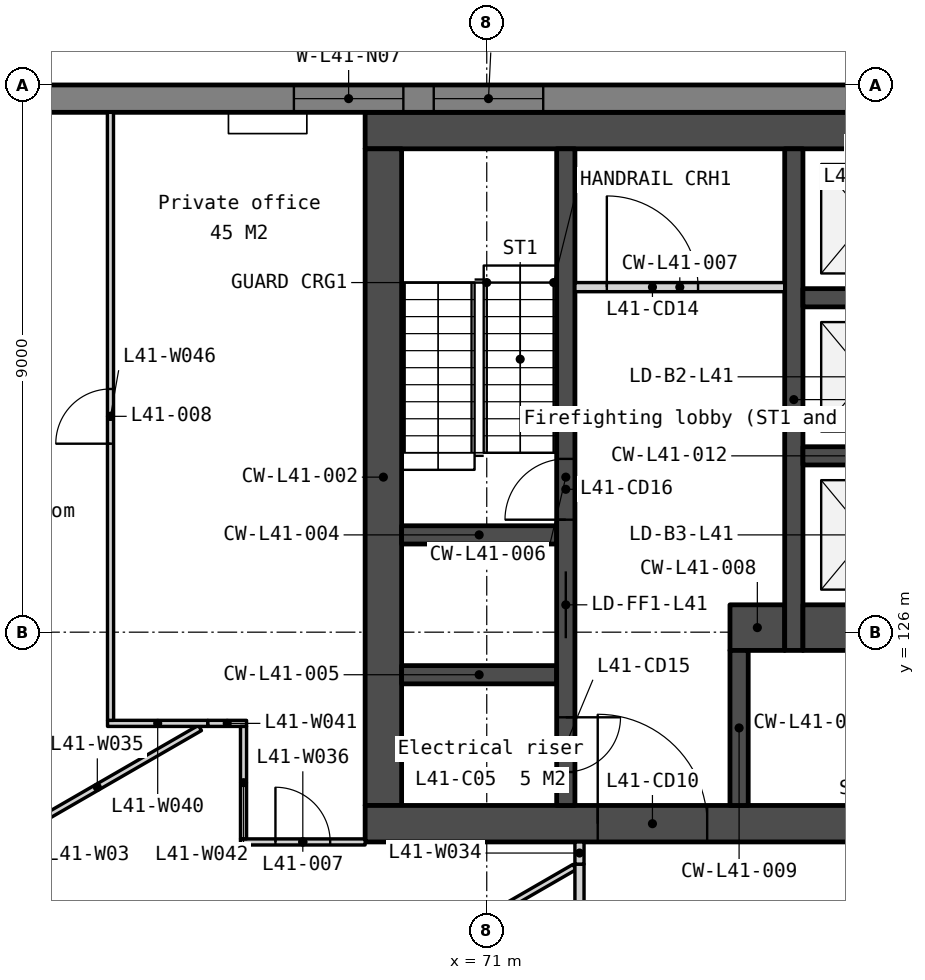
"""IFC4 building model, lengths in metres.
Left out: names, types, materials, properties, quantities, classifications, styles, units other than length and angle.
Written with IfcOpenShell. Run it as: python <this file> out.ifc"""

import sys

from ifc_helpers import new_model, si_unit, direction, frame, frame_2d, origin, place, context, subcontext, project, spatial, polyline, rectangle, outline, extrude, element, fill, save


model = new_model("IFC4")
c1 = context("Model", 3, precision=1e-05, world=origin(), true_north=direction((0.0, 1.0)))
c2 = subcontext(c1, "Body", "Model", "MODEL_VIEW")
j1 = project(units=[si_unit("LENGTHUNIT", "METRE"), si_unit("PLANEANGLEUNIT", "RADIAN")], contexts=[c1])
p1 = place(None, origin())
s1 = spatial("IfcSite", under=j1, at=p1, CompositionType="ELEMENT")
p2 = place(p1, origin())
s2 = spatial("IfcBuilding", under=s1, at=p2, CompositionType="ELEMENT")
p3 = place(p2, frame((0.0, 0.0, 163.7)))
s3 = spatial("IfcBuildingStorey", under=s2, at=p3, CompositionType="ELEMENT", Elevation=163.7)
p4 = place(p3, frame((69.0, 134.25, 0.0), z_axis=(0.0, 0.0, 1.0), x_axis=(1.0, 0.0, 0.0)))
e1 = element("IfcWall", 1, at=p4, inside=s3, PredefinedType="SOLIDWALL", context=c2, shape_type="SweptSolid", body=[
    extrude(rectangle(XDim=22.0, YDim=0.6, at=frame_2d((11.0, 0.0))), origin(), (0.0, 0.0, 1.0), 3.75),
])
p5 = place(p3, frame((69.3, 133.95, 0.0), z_axis=(0.0, 0.0, 1.0), x_axis=(0.0, -1.0, 0.0)))
e2 = element("IfcWall", 2, at=p5, inside=s3, PredefinedType="SOLIDWALL", context=c2, shape_type="SweptSolid", body=[
    extrude(rectangle(XDim=10.8, YDim=0.6, at=frame_2d((5.4, 0.0))), origin(), (0.0, 0.0, 1.0), 3.75),
])
p6 = place(p3, frame((69.0, 122.85, 0.0), z_axis=(0.0, 0.0, 1.0), x_axis=(1.0, 0.0, 0.0)))
e3 = element("IfcWall", 3, at=p6, inside=s3, PredefinedType="SOLIDWALL", context=c2, shape_type="SweptSolid", body=[
    extrude(rectangle(XDim=22.0, YDim=0.6, at=frame_2d((11.0, 0.0))), origin(), (0.0, 0.0, 1.0), 3.75),
])
p7 = place(p6, frame((16.375, 0.0, 0.0)))
e4 = element("IfcOpeningElement", 4, at=p7, cuts=e3, PredefinedType="OPENING", context=c2, shape_type="SweptSolid", body=[
    extrude(rectangle(XDim=1.8, YDim=2.1, at=frame_2d((0.9, 1.05))), frame((0.0, 0.31, 0.0), z_axis=(0.0, -1.0, 0.0), x_axis=(1.0, 0.0, 0.0)), (0.0, 0.0, 1.0), 0.62),
])
p8 = place(p6, frame((3.825, 0.0, 0.0)))
e5 = element("IfcOpeningElement", 5, at=p8, cuts=e3, PredefinedType="OPENING", context=c2, shape_type="SweptSolid", body=[
    extrude(rectangle(XDim=1.8, YDim=2.1, at=frame_2d((0.9, 1.05))), frame((0.0, 0.31, 0.0), z_axis=(0.0, -1.0, 0.0), x_axis=(1.0, 0.0, 0.0)), (0.0, 0.0, 1.0), 0.62),
])
p9 = place(p6, frame((12.85, 0.0, 0.0)))
e6 = element("IfcOpeningElement", 6, at=p9, cuts=e3, PredefinedType="OPENING", context=c2, shape_type="SweptSolid", body=[
    extrude(rectangle(XDim=1.5, YDim=2.1, at=frame_2d((0.75, 1.05))), frame((0.0, 0.31, 0.0), z_axis=(0.0, -1.0, 0.0), x_axis=(1.0, 0.0, 0.0)), (0.0, 0.0, 1.0), 0.62),
])
for number, where, z_axis, x_axis in (
    (7, (69.6, 127.6, 0.0), (0.0, 0.0, 1.0), (1.0, 0.0, 0.0)),
    (8, (69.6, 125.3, 0.0), (0.0, 0.0, 1.0), (1.0, 0.0, 0.0)),
):
    element("IfcWall", number, at=place(p3, frame(where, z_axis=z_axis, x_axis=x_axis)), inside=s3, PredefinedType="SOLIDWALL", context=c2, shape_type="SweptSolid", body=[
        extrude(rectangle(XDim=2.55, YDim=0.3, at=frame_2d((1.275, 0.0))), origin(), (0.0, 0.0, 1.0), 3.75),
    ])
p10 = place(p3, frame((72.3, 133.95, 0.0), z_axis=(0.0, 0.0, 1.0), x_axis=(0.0, -1.0, 0.0)))
e9 = element("IfcWall", 9, at=p10, inside=s3, PredefinedType="SOLIDWALL", context=c2, shape_type="SweptSolid", body=[
    extrude(rectangle(XDim=10.8, YDim=0.3, at=frame_2d((5.4, 0.0))), origin(), (0.0, 0.0, 1.0), 3.75),
])
p11 = place(p10, frame((6.95, 0.0, 0.0)))
e10 = element("IfcOpeningElement", 10, at=p11, cuts=e9, PredefinedType="OPENING", context=c2, shape_type="SweptSolid", body=[
    extrude(rectangle(XDim=1.1, YDim=2.1, at=frame_2d((0.55, 1.05))), frame((0.0, 0.16, 0.0), z_axis=(0.0, -1.0, 0.0), x_axis=(1.0, 0.0, 0.0)), (0.0, 0.0, 1.0), 0.32),
])
p12 = place(p10, frame((9.35, 0.0, 0.0)))
e11 = element("IfcOpeningElement", 11, at=p12, cuts=e9, PredefinedType="OPENING", context=c2, shape_type="SweptSolid", body=[
    extrude(rectangle(XDim=0.9, YDim=2.1, at=frame_2d((0.45, 1.05))), frame((0.0, 0.16, 0.0), z_axis=(0.0, -1.0, 0.0), x_axis=(1.0, 0.0, 0.0)), (0.0, 0.0, 1.0), 0.32),
])
p13 = place(p10, frame((5.1, 0.0, 0.0)))
e12 = element("IfcOpeningElement", 12, at=p13, cuts=e9, PredefinedType="OPENING", context=c2, shape_type="SweptSolid", body=[
    extrude(rectangle(XDim=1.0, YDim=2.1, at=frame_2d((0.5, 1.05))), frame((0.0, 0.16, 0.0), z_axis=(0.0, -1.0, 0.0), x_axis=(1.0, 0.0, 0.0)), (0.0, 0.0, 1.0), 0.32),
])
p14 = place(p3, frame((72.45, 131.675, 0.0), z_axis=(0.0, 0.0, 1.0), x_axis=(1.0, 0.0, 0.0)))
e13 = element("IfcWall", 13, at=p14, inside=s3, PredefinedType="PARTITIONING", context=c2, shape_type="SweptSolid", body=[
    extrude(rectangle(XDim=3.45, YDim=0.15, at=frame_2d((1.725, 0.0))), origin(), (0.0, 0.0, 1.0), 3.75),
])
p15 = place(p14, frame((0.525, 0.0, 0.0)))
e14 = element("IfcOpeningElement", 14, at=p15, cuts=e13, PredefinedType="OPENING", context=c2, shape_type="SweptSolid", body=[
    extrude(rectangle(XDim=1.5, YDim=2.1, at=frame_2d((0.75, 1.05))), frame((0.0, 0.085, 0.0), z_axis=(0.0, -1.0, 0.0), x_axis=(1.0, 0.0, 0.0)), (0.0, 0.0, 1.0), 0.17),
])
p16 = place(p3, frame((75.0, 126.075, 0.0), z_axis=(0.0, 0.0, 1.0), x_axis=(1.0, 0.0, 0.0)))
e15 = element("IfcWall", 15, at=p16, inside=s3, PredefinedType="SOLIDWALL", context=c2, shape_type="SweptSolid", body=[
    extrude(rectangle(XDim=0.9, YDim=0.75, at=frame_2d((0.45, 0.0))), origin(), (0.0, 0.0, 1.0), 3.75),
])
p17 = place(p3, frame((75.15, 125.7, 0.0), z_axis=(0.0, 0.0, 1.0), x_axis=(0.0, -1.0, 0.0)))
e16 = element("IfcWall", 16, at=p17, inside=s3, PredefinedType="SOLIDWALL", context=c2, shape_type="SweptSolid", body=[
    extrude(rectangle(XDim=2.55, YDim=0.3, at=frame_2d((1.275, 0.0))), origin(), (0.0, 0.0, 1.0), 3.75),
])
p18 = place(p3, frame((76.05, 133.95, 0.0), z_axis=(0.0, 0.0, 1.0), x_axis=(0.0, -1.0, 0.0)))
e17 = element("IfcWall", 17, at=p18, inside=s3, PredefinedType="SOLIDWALL", context=c2, shape_type="SweptSolid", body=[
    extrude(rectangle(XDim=8.25, YDim=0.3, at=frame_2d((4.125, 0.0))), origin(), (0.0, 0.0, 1.0), 3.75),
])
for number, where, z_axis, x_axis in (
    (18, (76.2, 131.5, 0.0), (0.0, 0.0, 1.0), (1.0, 0.0, 0.0)),
    (19, (76.2, 128.9, 0.0), (0.0, 0.0, 1.0), (1.0, 0.0, 0.0)),
):
    element("IfcWall", number, at=place(p3, frame(where, z_axis=z_axis, x_axis=x_axis)), inside=s3, PredefinedType="SOLIDWALL", context=c2, shape_type="SweptSolid", body=[
        extrude(rectangle(XDim=2.1, YDim=0.3, at=frame_2d((1.05, 0.0))), origin(), (0.0, 0.0, 1.0), 3.75),
    ])
p19 = place(p3, frame((76.2, 126.075, 0.0), z_axis=(0.0, 0.0, 1.0), x_axis=(1.0, 0.0, 0.0)))
e20 = element("IfcWall", 20, at=p19, inside=s3, PredefinedType="SOLIDWALL", context=c2, shape_type="SweptSolid", body=[
    extrude(rectangle(XDim=2.1, YDim=0.75, at=frame_2d((1.05, 0.0))), origin(), (0.0, 0.0, 1.0), 3.75),
])
p20 = place(p3, frame((100.243, 134.775, -0.15), z_axis=(0.0, 0.0, 1.0), x_axis=(-1.0, 0.0, 0.0)))
e21 = element("IfcWall", 21, at=p20, inside=s3, PredefinedType="SOLIDWALL", context=c2, shape_type="SweptSolid", body=[
    extrude(outline(polyline([(40.486, 0.0), (40.486, 3.9), (0.0, 3.9), (0.0, 0.0), (40.486, 0.0)])), frame((0.0, 0.225, 0.0), z_axis=(0.0, -1.0, 0.0), x_axis=(1.0, 0.0, 0.0)), (0.0, 0.0, 1.0), 0.45),
])
p21 = place(p20, frame((0.837, 0.0, 0.95)))
e22 = element("IfcOpeningElement", 22, at=p21, cuts=e21, PredefinedType="OPENING", context=c2, shape_type="SweptSolid", body=[
    extrude(rectangle(XDim=1.2, YDim=2.2, at=frame_2d((0.6, 1.1))), frame((0.0, 0.235, 0.0), z_axis=(0.0, -1.0, 0.0), x_axis=(1.0, 0.0, 0.0)), (0.0, 0.0, 1.0), 0.47),
])
p22 = place(p20, frame((8.072, 0.0, 0.95)))
e23 = element("IfcOpeningElement", 23, at=p22, cuts=e21, PredefinedType="OPENING", context=c2, shape_type="SweptSolid", body=[
    extrude(rectangle(XDim=1.8, YDim=2.2, at=frame_2d((0.9, 1.1))), frame((0.0, 0.235, 0.0), z_axis=(0.0, -1.0, 0.0), x_axis=(1.0, 0.0, 0.0)), (0.0, 0.0, 1.0), 0.47),
])
p23 = place(p20, frame((10.372, 0.0, 0.95)))
e24 = element("IfcOpeningElement", 24, at=p23, cuts=e21, PredefinedType="OPENING", context=c2, shape_type="SweptSolid", body=[
    extrude(rectangle(XDim=1.8, YDim=2.2, at=frame_2d((0.9, 1.1))), frame((0.0, 0.235, 0.0), z_axis=(0.0, -1.0, 0.0), x_axis=(1.0, 0.0, 0.0)), (0.0, 0.0, 1.0), 0.47),
])
p24 = place(p20, frame((18.193, 0.0, 0.95)))
e25 = element("IfcOpeningElement", 25, at=p24, cuts=e21, PredefinedType="OPENING", context=c2, shape_type="SweptSolid", body=[
    extrude(rectangle(XDim=1.8, YDim=2.2, at=frame_2d((0.9, 1.1))), frame((0.0, 0.235, 0.0), z_axis=(0.0, -1.0, 0.0), x_axis=(1.0, 0.0, 0.0)), (0.0, 0.0, 1.0), 0.47),
])
p25 = place(p20, frame((20.493, 0.0, 0.95)))
e26 = element("IfcOpeningElement", 26, at=p25, cuts=e21, PredefinedType="OPENING", context=c2, shape_type="SweptSolid", body=[
    extrude(rectangle(XDim=1.8, YDim=2.2, at=frame_2d((0.9, 1.1))), frame((0.0, 0.235, 0.0), z_axis=(0.0, -1.0, 0.0), x_axis=(1.0, 0.0, 0.0)), (0.0, 0.0, 1.0), 0.47),
])
p26 = place(p20, frame((28.315, 0.0, 0.95)))
e27 = element("IfcOpeningElement", 27, at=p26, cuts=e21, PredefinedType="OPENING", context=c2, shape_type="SweptSolid", body=[
    extrude(rectangle(XDim=1.8, YDim=2.2, at=frame_2d((0.9, 1.1))), frame((0.0, 0.235, 0.0), z_axis=(0.0, -1.0, 0.0), x_axis=(1.0, 0.0, 0.0)), (0.0, 0.0, 1.0), 0.47),
])
p27 = place(p20, frame((30.615, 0.0, 0.95)))
e28 = element("IfcOpeningElement", 28, at=p27, cuts=e21, PredefinedType="OPENING", context=c2, shape_type="SweptSolid", body=[
    extrude(rectangle(XDim=1.8, YDim=2.2, at=frame_2d((0.9, 1.1))), frame((0.0, 0.235, 0.0), z_axis=(0.0, -1.0, 0.0), x_axis=(1.0, 0.0, 0.0)), (0.0, 0.0, 1.0), 0.47),
])
p28 = place(p20, frame((38.449, 0.0, 0.95)))
e29 = element("IfcOpeningElement", 29, at=p28, cuts=e21, PredefinedType="OPENING", context=c2, shape_type="SweptSolid", body=[
    extrude(rectangle(XDim=1.2, YDim=2.2, at=frame_2d((0.6, 1.1))), frame((0.0, 0.235, 0.0), z_axis=(0.0, -1.0, 0.0), x_axis=(1.0, 0.0, 0.0)), (0.0, 0.0, 1.0), 0.47),
])
p29 = place(p3, frame((57.652, 131.129, -0.15), z_axis=(0.0, 0.0, 1.0), x_axis=(0.499997369791, -0.866026922331, 0.0)))
e30 = element("IfcWall", 30, at=p29, inside=s3, PredefinedType="SOLIDWALL", context=c2, shape_type="SweptSolid", body=[
    extrude(outline(polyline([(40.486, 0.0), (40.486, 3.9), (0.0, 3.9), (0.0, 0.0), (40.486, 0.0)])), frame((0.0, 0.225, 0.0), z_axis=(0.0, -1.0, 0.0), x_axis=(1.0, 0.0, 0.0)), (0.0, 0.0, 1.0), 0.45),
])
p30 = place(p29, frame((0.837, 0.0, 0.95)))
e31 = element("IfcOpeningElement", 31, at=p30, cuts=e30, PredefinedType="OPENING", context=c2, shape_type="SweptSolid", body=[
    extrude(rectangle(XDim=1.2, YDim=2.2, at=frame_2d((0.6, 1.1))), frame((0.0, 0.235, 0.0), z_axis=(0.0, -1.0, 0.0), x_axis=(1.0, 0.0, 0.0)), (0.0, 0.0, 1.0), 0.47),
])
p31 = place(p29, frame((8.072, 0.0, 0.95)))
e32 = element("IfcOpeningElement", 32, at=p31, cuts=e30, PredefinedType="OPENING", context=c2, shape_type="SweptSolid", body=[
    extrude(rectangle(XDim=1.8, YDim=2.2, at=frame_2d((0.9, 1.1))), frame((0.0, 0.235, 0.0), z_axis=(0.0, -1.0, 0.0), x_axis=(1.0, 0.0, 0.0)), (0.0, 0.0, 1.0), 0.47),
])
p32 = place(p29, frame((10.372, 0.0, 0.95)))
e33 = element("IfcOpeningElement", 33, at=p32, cuts=e30, PredefinedType="OPENING", context=c2, shape_type="SweptSolid", body=[
    extrude(rectangle(XDim=1.8, YDim=2.2, at=frame_2d((0.9, 1.1))), frame((0.0, 0.235, 0.0), z_axis=(0.0, -1.0, 0.0), x_axis=(1.0, 0.0, 0.0)), (0.0, 0.0, 1.0), 0.47),
])
p33 = place(p29, frame((18.193, 0.0, 0.95)))
e34 = element("IfcOpeningElement", 34, at=p33, cuts=e30, PredefinedType="OPENING", context=c2, shape_type="SweptSolid", body=[
    extrude(rectangle(XDim=1.8, YDim=2.2, at=frame_2d((0.9, 1.1))), frame((0.0, 0.235, 0.0), z_axis=(0.0, -1.0, 0.0), x_axis=(1.0, 0.0, 0.0)), (0.0, 0.0, 1.0), 0.47),
])
p34 = place(p29, frame((20.493, 0.0, 0.95)))
e35 = element("IfcOpeningElement", 35, at=p34, cuts=e30, PredefinedType="OPENING", context=c2, shape_type="SweptSolid", body=[
    extrude(rectangle(XDim=1.8, YDim=2.2, at=frame_2d((0.9, 1.1))), frame((0.0, 0.235, 0.0), z_axis=(0.0, -1.0, 0.0), x_axis=(1.0, 0.0, 0.0)), (0.0, 0.0, 1.0), 0.47),
])
p35 = place(p29, frame((28.315, 0.0, 0.95)))
e36 = element("IfcOpeningElement", 36, at=p35, cuts=e30, PredefinedType="OPENING", context=c2, shape_type="SweptSolid", body=[
    extrude(rectangle(XDim=1.8, YDim=2.2, at=frame_2d((0.9, 1.1))), frame((0.0, 0.235, 0.0), z_axis=(0.0, -1.0, 0.0), x_axis=(1.0, 0.0, 0.0)), (0.0, 0.0, 1.0), 0.47),
])
p36 = place(p29, frame((30.615, 0.0, 0.95)))
e37 = element("IfcOpeningElement", 37, at=p36, cuts=e30, PredefinedType="OPENING", context=c2, shape_type="SweptSolid", body=[
    extrude(rectangle(XDim=1.8, YDim=2.2, at=frame_2d((0.9, 1.1))), frame((0.0, 0.235, 0.0), z_axis=(0.0, -1.0, 0.0), x_axis=(1.0, 0.0, 0.0)), (0.0, 0.0, 1.0), 0.47),
])
p37 = place(p29, frame((38.449, 0.0, 0.95)))
e38 = element("IfcOpeningElement", 38, at=p37, cuts=e30, PredefinedType="OPENING", context=c2, shape_type="SweptSolid", body=[
    extrude(rectangle(XDim=1.2, YDim=2.2, at=frame_2d((0.6, 1.1))), frame((0.0, 0.235, 0.0), z_axis=(0.0, -1.0, 0.0), x_axis=(1.0, 0.0, 0.0)), (0.0, 0.0, 1.0), 0.47),
])
p38 = place(p3, frame((65.438, 118.093, 0.0), z_axis=(0.0, 0.0, 1.0), x_axis=(0.866029768103, 0.499992440702, 0.0)))
e39 = element("IfcWall", 39, at=p38, inside=s3, PredefinedType="PARTITIONING", context=c2, shape_type="SweptSolid", body=[
    extrude(rectangle(XDim=8.089, YDim=0.1, at=frame_2d((4.044, 0.0))), origin(), (0.0, 0.0, 1.0), 3.75),
])
p39 = place(p38, frame((3.594, 0.0, 0.0)))
e40 = element("IfcOpeningElement", 40, at=p39, cuts=e39, PredefinedType="OPENING", context=c2, shape_type="SweptSolid", body=[
    extrude(rectangle(XDim=0.9, YDim=2.1, at=frame_2d((0.45, 1.05))), frame((0.0, 0.06, 0.0), z_axis=(0.0, -1.0, 0.0), x_axis=(1.0, 0.0, 0.0)), (0.0, 0.0, 1.0), 0.12),
])
p40 = place(p3, frame((72.525, 119.875, 0.0), z_axis=(0.0, 0.0, 1.0), x_axis=(0.0, 1.0, 0.0)))
e41 = element("IfcWall", 41, at=p40, inside=s3, PredefinedType="PARTITIONING", context=c2, shape_type="SweptSolid", body=[
    extrude(rectangle(XDim=2.31, YDim=0.15, at=frame_2d((1.155, 0.0))), origin(), (0.0, 0.0, 1.0), 3.75),
])
p41 = place(p3, frame((72.525, 122.185, 0.0), z_axis=(0.0, 0.0, 1.0), x_axis=(0.0, 1.0, 0.0)))
e42 = element("IfcWall", 42, at=p41, inside=s3, PredefinedType="PARTITIONING", context=c2, shape_type="SweptSolid", body=[
    extrude(rectangle(XDim=0.365, YDim=0.15, at=frame_2d((0.183, 0.0))), origin(), (0.0, 0.0, 1.0), 3.75),
])
p42 = place(p3, frame((62.907, 122.476, 0.0), z_axis=(0.0, 0.0, 1.0), x_axis=(0.866014543207, 0.500018810599, 0.0)))
e43 = element("IfcWall", 43, at=p42, inside=s3, PredefinedType="PARTITIONING", context=c2, shape_type="SweptSolid", body=[
    extrude(rectangle(XDim=3.898, YDim=0.1, at=frame_2d((1.949, 0.0))), origin(), (0.0, 0.0, 1.0), 3.75),
])
p43 = place(p3, frame((66.95, 122.55, 0.0), z_axis=(0.0, 0.0, 1.0), x_axis=(1.0, 0.0, 0.0)))
e44 = element("IfcWall", 44, at=p43, inside=s3, PredefinedType="PARTITIONING", context=c2, shape_type="SweptSolid", body=[
    extrude(rectangle(XDim=2.05, YDim=0.1, at=frame_2d((1.025, 0.0))), origin(), (0.0, 0.0, 1.0), 3.75),
])
p44 = place(p43, frame((0.575, 0.0, 0.0)))
e45 = element("IfcOpeningElement", 45, at=p44, cuts=e44, PredefinedType="OPENING", context=c2, shape_type="SweptSolid", body=[
    extrude(rectangle(XDim=0.9, YDim=2.1, at=frame_2d((0.45, 1.05))), frame((0.0, 0.06, 0.0), z_axis=(0.0, -1.0, 0.0), x_axis=(1.0, 0.0, 0.0)), (0.0, 0.0, 1.0), 0.12),
])
p45 = place(p3, frame((64.763, 124.5, 0.0), z_axis=(0.0, 0.0, 1.0), x_axis=(1.0, 0.0, 0.0)))
e46 = element("IfcWall", 46, at=p45, inside=s3, PredefinedType="PARTITIONING", context=c2, shape_type="SweptSolid", body=[
    extrude(rectangle(XDim=1.65, YDim=0.1, at=frame_2d((0.825, 0.0))), origin(), (0.0, 0.0, 1.0), 3.75),
])
p46 = place(p3, frame((66.414, 124.5, 0.0), z_axis=(0.0, 0.0, 1.0), x_axis=(1.0, 0.0, 0.0)))
e47 = element("IfcWall", 47, at=p46, inside=s3, PredefinedType="PARTITIONING", context=c2, shape_type="SweptSolid", body=[
    extrude(rectangle(XDim=0.636, YDim=0.1, at=frame_2d((0.318, 0.0))), origin(), (0.0, 0.0, 1.0), 3.75),
])
p47 = place(p3, frame((67.0, 122.6, 0.0), z_axis=(0.0, 0.0, 1.0), x_axis=(0.0, 1.0, 0.0)))
e48 = element("IfcWall", 48, at=p47, inside=s3, PredefinedType="PARTITIONING", context=c2, shape_type="SweptSolid", body=[
    extrude(rectangle(XDim=1.85, YDim=0.1, at=frame_2d((0.925, 0.0))), origin(), (0.0, 0.0, 1.0), 3.75),
])
p48 = place(p3, frame((64.813, 124.55, 0.0), z_axis=(0.0, 0.0, 1.0), x_axis=(-0.000195312496, 0.999999980927, 0.0)))
e49 = element("IfcWall", 49, at=p48, inside=s3, PredefinedType="PARTITIONING", context=c2, shape_type="SweptSolid", body=[
    extrude(rectangle(XDim=10.0, YDim=0.1, at=frame_2d((5.0, 0.0))), origin(), (0.0, 0.0, 1.0), 3.75),
])
p49 = place(p48, frame((4.55, 0.0, 0.0)))
e50 = element("IfcOpeningElement", 50, at=p49, cuts=e49, PredefinedType="OPENING", context=c2, shape_type="SweptSolid", body=[
    extrude(rectangle(XDim=0.9, YDim=2.1, at=frame_2d((0.45, 1.05))), frame((0.0, 0.06, 0.0), z_axis=(0.0, -1.0, 0.0), x_axis=(1.0, 0.0, 0.0)), (0.0, 0.0, 1.0), 0.12),
])
p50 = place(p11, origin())
e51 = element("IfcDoor", 51, at=p50, inside=s3, OperationType="SLIDING_TO_LEFT", PredefinedType="DOOR", context=c2, shape_type="SweptSolid", body=[
    extrude(rectangle(XDim=1.1, YDim=2.1, at=frame_2d((0.55, 1.05))), frame((0.0, 0.025, 0.0), z_axis=(0.0, -1.0, 0.0), x_axis=(1.0, 0.0, 0.0)), (0.0, 0.0, 1.0), 0.05),
])
fill(e10, e51)
p51 = place(p8, origin())
e52 = element("IfcDoor", 52, at=p51, inside=s3, OperationType="DOUBLE_DOOR_DOUBLE_SWING", PredefinedType="DOOR", context=c2, shape_type="SweptSolid", body=[
    extrude(rectangle(XDim=1.8, YDim=2.1, at=frame_2d((0.9, 1.05))), frame((0.0, 0.025, 0.0), z_axis=(0.0, -1.0, 0.0), x_axis=(1.0, 0.0, 0.0)), (0.0, 0.0, 1.0), 0.05),
])
fill(e5, e52)
p52 = place(p15, origin())
e53 = element("IfcDoor", 53, at=p52, inside=s3, OperationType="DOUBLE_DOOR_DOUBLE_SWING", PredefinedType="DOOR", context=c2, shape_type="SweptSolid", body=[
    extrude(rectangle(XDim=1.5, YDim=2.1, at=frame_2d((0.75, 1.05))), frame((0.0, 0.025, 0.0), z_axis=(0.0, -1.0, 0.0), x_axis=(1.0, 0.0, 0.0)), (0.0, 0.0, 1.0), 0.05),
])
fill(e14, e53)
p53 = place(p12, origin())
e54 = element("IfcDoor", 54, at=p53, inside=s3, OperationType="SINGLE_SWING_LEFT", PredefinedType="DOOR", context=c2, shape_type="SweptSolid", body=[
    extrude(rectangle(XDim=0.9, YDim=2.1, at=frame_2d((0.45, 1.05))), frame((0.0, 0.025, 0.0), z_axis=(0.0, -1.0, 0.0), x_axis=(1.0, 0.0, 0.0)), (0.0, 0.0, 1.0), 0.05),
])
fill(e11, e54)
p54 = place(p13, origin())
e55 = element("IfcDoor", 55, at=p54, inside=s3, OperationType="SINGLE_SWING_RIGHT", PredefinedType="DOOR", context=c2, shape_type="SweptSolid", body=[
    extrude(rectangle(XDim=1.0, YDim=2.1, at=frame_2d((0.5, 1.05))), frame((0.0, 0.025, 0.0), z_axis=(0.0, -1.0, 0.0), x_axis=(1.0, 0.0, 0.0)), (0.0, 0.0, 1.0), 0.05),
])
fill(e12, e55)
p55 = place(p26, origin())
e56 = element("IfcWindow", 56, at=p55, inside=s3, PartitioningType="SINGLE_PANEL", PredefinedType="WINDOW", context=c2, shape_type="SweptSolid", body=[
    extrude(rectangle(XDim=1.8, YDim=2.2, at=frame_2d((0.9, 1.1))), frame((0.0, 0.03, 0.0), z_axis=(0.0, -1.0, 0.0), x_axis=(1.0, 0.0, 0.0)), (0.0, 0.0, 1.0), 0.06),
])
fill(e27, e56)
p56 = place(p27, origin())
e57 = element("IfcWindow", 57, at=p56, inside=s3, PartitioningType="SINGLE_PANEL", PredefinedType="WINDOW", context=c2, shape_type="SweptSolid", body=[
    extrude(rectangle(XDim=1.8, YDim=2.2, at=frame_2d((0.9, 1.1))), frame((0.0, 0.03, 0.0), z_axis=(0.0, -1.0, 0.0), x_axis=(1.0, 0.0, 0.0)), (0.0, 0.0, 1.0), 0.06),
])
fill(e28, e57)
p57 = place(p44, origin())
e58 = element("IfcDoor", 58, at=p57, inside=s3, OperationType="SINGLE_SWING_LEFT", PredefinedType="DOOR", context=c2, shape_type="SweptSolid", body=[
    extrude(rectangle(XDim=0.9, YDim=2.1, at=frame_2d((0.45, 1.05))), frame((0.0, 0.025, 0.0), z_axis=(0.0, -1.0, 0.0), x_axis=(1.0, 0.0, 0.0)), (0.0, 0.0, 1.0), 0.05),
])
fill(e45, e58)
p58 = place(p49, origin())
e59 = element("IfcDoor", 59, at=p58, inside=s3, OperationType="SINGLE_SWING_LEFT", PredefinedType="DOOR", context=c2, shape_type="SweptSolid", body=[
    extrude(rectangle(XDim=0.9, YDim=2.1, at=frame_2d((0.45, 1.05))), frame((0.0, 0.025, 0.0), z_axis=(0.0, -1.0, 0.0), x_axis=(1.0, 0.0, 0.0)), (0.0, 0.0, 1.0), 0.05),
])
fill(e50, e59)
save(model, sys.argv[1])
